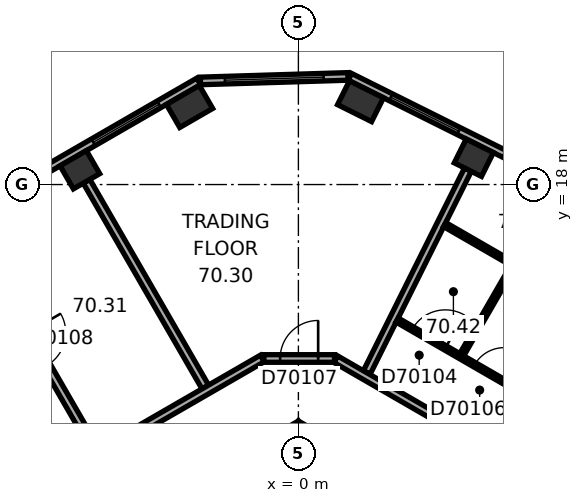
"""IFC4 building model, lengths in metres.
Left out: names, types, materials, properties, quantities, classifications, styles, units other than length and angle.
Written with IfcOpenShell. Run it as: python <this file> out.ifc"""

import sys

from ifc_helpers import new_model, si_unit, direction, frame, frame_2d, origin, origin_2d, place, context, subcontext, project, spatial, rectangle, extrude, element, fill, save


model = new_model("IFC4")
c1 = context("Model", 3, precision=1e-05, world=origin(), true_north=direction((0.0, 1.0)))
c2 = subcontext(c1, "Body", "Model", "MODEL_VIEW")
j1 = project(units=[si_unit("LENGTHUNIT", "METRE"), si_unit("PLANEANGLEUNIT", "RADIAN")], contexts=[c1])
p1 = place(None, origin())
s1 = spatial("IfcSite", under=j1, at=p1, CompositionType="ELEMENT")
p2 = place(p1, origin())
s2 = spatial("IfcBuilding", under=s1, at=p2, CompositionType="ELEMENT")
p3 = place(p2, frame((0.0, 0.0, 285.7)))
s3 = spatial("IfcBuildingStorey", under=s2, at=p3, CompositionType="ELEMENT", Elevation=285.7)
p4 = place(p3, frame((4.616, 18.706, 0.0), z_axis=(0.0, 0.0, 1.0), x_axis=(-0.894934361602, 0.44619781311, 0.0)))
e1 = element("IfcColumn", 1, at=p4, inside=s3, PredefinedType="COLUMN", context=c2, shape_type="SweptSolid", body=[
    extrude(rectangle(XDim=0.8, YDim=0.7, at=origin_2d()), origin(), (0.0, 0.0, 1.0), 3.7),
])
for number, where, z_axis, x_axis in (
    (2, (1.635, 20.192, 0.0), (0.0, 0.0, 1.0), (-0.895, 0.446, 0.0)),
    (3, (-2.864, 20.055, 0.0), (0.0, 0.0, 1.0), (-0.866, -0.5, 0.0)),
):
    element("IfcColumn", number, at=place(p3, frame(where, z_axis=z_axis, x_axis=x_axis)), inside=s3, PredefinedType="COLUMN", context=c2, shape_type="SweptSolid", body=[
        extrude(rectangle(XDim=1.0, YDim=0.7, at=origin_2d()), origin(), (0.0, 0.0, 1.0), 3.7),
    ])
p5 = place(p3, frame((-5.75, 18.389, 0.0), z_axis=(0.0, 0.0, 1.0), x_axis=(-0.866025403784, -0.5, 0.0)))
e4 = element("IfcColumn", 4, at=p5, inside=s3, PredefinedType="COLUMN", context=c2, shape_type="SweptSolid", body=[
    extrude(rectangle(XDim=0.8, YDim=0.7, at=origin_2d()), origin(), (0.0, 0.0, 1.0), 3.7),
])
p6 = place(p3, frame((10.025, 5.586, 0.0), z_axis=(0.0, 0.0, 1.0), x_axis=(-0.866026453023, 0.499998182661, 0.0)))
e5 = element("IfcWall", 5, at=p6, inside=s3, PredefinedType="SHEAR", context=c2, shape_type="SweptSolid", body=[
    extrude(rectangle(XDim=11.778, YDim=0.7, at=frame_2d((5.889, 0.0))), origin(), (0.0, 0.0, 1.0), 3.7),
])
p7 = place(p6, frame((5.139, 0.0, 0.0)))
e6 = element("IfcOpeningElement", 6, at=p7, cuts=e5, PredefinedType="OPENING", context=c2, shape_type="SweptSolid", body=[
    extrude(rectangle(XDim=0.9, YDim=2.1, at=frame_2d((0.45, 1.05))), frame((0.0, 0.36, 0.0), z_axis=(0.0, -1.0, 0.0), x_axis=(1.0, 0.0, 0.0)), (0.0, 0.0, 1.0), 0.72),
])
p8 = place(p3, frame((0.175, 11.475, 0.0), z_axis=(0.0, 0.0, 1.0), x_axis=(-0.866026453023, -0.499998182661, 0.0)))
e7 = element("IfcWall", 7, at=p8, inside=s3, PredefinedType="SHEAR", context=c2, shape_type="SweptSolid", body=[
    extrude(rectangle(XDim=11.778, YDim=0.7, at=frame_2d((5.889, 0.0))), origin(), (0.0, 0.0, 1.0), 3.7),
])
p9 = place(p8, frame((6.089, 0.0, 0.0)))
e8 = element("IfcOpeningElement", 8, at=p9, cuts=e7, PredefinedType="OPENING", context=c2, shape_type="SweptSolid", body=[
    extrude(rectangle(XDim=1.5, YDim=2.1, at=frame_2d((0.75, 1.05))), frame((0.0, 0.36, 0.0), z_axis=(0.0, -1.0, 0.0), x_axis=(1.0, 0.0, 0.0)), (0.0, 0.0, 1.0), 0.72),
])
p10 = place(p8, frame((2.939, 0.0, 0.0)))
e9 = element("IfcOpeningElement", 9, at=p10, cuts=e7, PredefinedType="OPENING", context=c2, shape_type="SweptSolid", body=[
    extrude(rectangle(XDim=0.9, YDim=2.1, at=frame_2d((0.45, 1.05))), frame((0.0, 0.36, 0.0), z_axis=(0.0, -1.0, 0.0), x_axis=(1.0, 0.0, 0.0)), (0.0, 0.0, 1.0), 0.72),
])
p11 = place(p3, frame((17.223, 12.923, 0.0), z_axis=(0.0, 0.0, 1.0), x_axis=(-0.894930561148, 0.44620543556, 0.0)))
e10 = element("IfcWall", 10, at=p11, inside=s3, PredefinedType="STANDARD", context=c2, shape_type="SweptSolid", body=[
    extrude(rectangle(XDim=17.731, YDim=0.2, at=frame_2d((8.866, 0.0))), origin(), (0.0, 0.0, 1.0), 3.7),
])
p12 = place(p11, frame((1.202, 0.0, 0.9)))
e11 = element("IfcOpeningElement", 11, at=p12, cuts=e10, PredefinedType="OPENING", context=c2, shape_type="SweptSolid", body=[
    extrude(rectangle(XDim=2.0, YDim=2.0, at=frame_2d((1.0, 1.0))), frame((0.0, 0.11, 0.0), z_axis=(0.0, -1.0, 0.0), x_axis=(1.0, 0.0, 0.0)), (0.0, 0.0, 1.0), 0.22),
])
p13 = place(p11, frame((4.533, 0.0, 0.9)))
e12 = element("IfcOpeningElement", 12, at=p13, cuts=e10, PredefinedType="OPENING", context=c2, shape_type="SweptSolid", body=[
    extrude(rectangle(XDim=2.0, YDim=2.0, at=frame_2d((1.0, 1.0))), frame((0.0, 0.11, 0.0), z_axis=(0.0, -1.0, 0.0), x_axis=(1.0, 0.0, 0.0)), (0.0, 0.0, 1.0), 0.22),
])
p14 = place(p11, frame((7.865, 0.0, 0.9)))
e13 = element("IfcOpeningElement", 13, at=p14, cuts=e10, PredefinedType="OPENING", context=c2, shape_type="SweptSolid", body=[
    extrude(rectangle(XDim=2.0, YDim=2.0, at=frame_2d((1.0, 1.0))), frame((0.0, 0.11, 0.0), z_axis=(0.0, -1.0, 0.0), x_axis=(1.0, 0.0, 0.0)), (0.0, 0.0, 1.0), 0.22),
])
p15 = place(p11, frame((11.197, 0.0, 0.9)))
e14 = element("IfcOpeningElement", 14, at=p15, cuts=e10, PredefinedType="OPENING", context=c2, shape_type="SweptSolid", body=[
    extrude(rectangle(XDim=2.0, YDim=2.0, at=frame_2d((1.0, 1.0))), frame((0.0, 0.11, 0.0), z_axis=(0.0, -1.0, 0.0), x_axis=(1.0, 0.0, 0.0)), (0.0, 0.0, 1.0), 0.22),
])
p16 = place(p11, frame((14.528, 0.0, 0.9)))
e15 = element("IfcOpeningElement", 15, at=p16, cuts=e10, PredefinedType="OPENING", context=c2, shape_type="SweptSolid", body=[
    extrude(rectangle(XDim=2.0, YDim=2.0, at=frame_2d((1.0, 1.0))), frame((0.0, 0.11, 0.0), z_axis=(0.0, -1.0, 0.0), x_axis=(1.0, 0.0, 0.0)), (0.0, 0.0, 1.0), 0.22),
])
p17 = place(p3, frame((1.307, 20.845, 0.0), z_axis=(0.0, 0.0, 1.0), x_axis=(-0.999533654813, -0.030536419175, 0.0)))
e16 = element("IfcWall", 16, at=p17, inside=s3, PredefinedType="STANDARD", context=c2, shape_type="SweptSolid", body=[
    extrude(rectangle(XDim=3.885, YDim=0.2, at=frame_2d((1.943, 0.0))), origin(), (0.0, 0.0, 1.0), 3.7),
])
p18 = place(p17, frame((0.643, 0.0, 0.9)))
e17 = element("IfcOpeningElement", 17, at=p18, cuts=e16, PredefinedType="OPENING", context=c2, shape_type="SweptSolid", body=[
    extrude(rectangle(XDim=2.6, YDim=2.0, at=frame_2d((1.3, 1.0))), frame((0.0, 0.11, 0.0), z_axis=(0.0, -1.0, 0.0), x_axis=(1.0, 0.0, 0.0)), (0.0, 0.0, 1.0), 0.22),
])
p19 = place(p3, frame((-2.624, 20.713, 0.0), z_axis=(0.0, 0.0, 1.0), x_axis=(-0.866026460444, -0.499998169808, 0.0)))
e18 = element("IfcWall", 18, at=p19, inside=s3, PredefinedType="STANDARD", context=c2, shape_type="SweptSolid", body=[
    extrude(rectangle(XDim=17.731, YDim=0.2, at=frame_2d((8.866, 0.0))), origin(), (0.0, 0.0, 1.0), 3.7),
])
p20 = place(p19, frame((1.203, 0.0, 0.9)))
e19 = element("IfcOpeningElement", 19, at=p20, cuts=e18, PredefinedType="OPENING", context=c2, shape_type="SweptSolid", body=[
    extrude(rectangle(XDim=2.0, YDim=2.0, at=frame_2d((1.0, 1.0))), frame((0.0, 0.11, 0.0), z_axis=(0.0, -1.0, 0.0), x_axis=(1.0, 0.0, 0.0)), (0.0, 0.0, 1.0), 0.22),
])
p21 = place(p19, frame((4.535, 0.0, 0.9)))
e20 = element("IfcOpeningElement", 20, at=p21, cuts=e18, PredefinedType="OPENING", context=c2, shape_type="SweptSolid", body=[
    extrude(rectangle(XDim=2.0, YDim=2.0, at=frame_2d((1.0, 1.0))), frame((0.0, 0.11, 0.0), z_axis=(0.0, -1.0, 0.0), x_axis=(1.0, 0.0, 0.0)), (0.0, 0.0, 1.0), 0.22),
])
p22 = place(p19, frame((7.867, 0.0, 0.9)))
e21 = element("IfcOpeningElement", 21, at=p22, cuts=e18, PredefinedType="OPENING", context=c2, shape_type="SweptSolid", body=[
    extrude(rectangle(XDim=2.0, YDim=2.0, at=frame_2d((1.0, 1.0))), frame((0.0, 0.11, 0.0), z_axis=(0.0, -1.0, 0.0), x_axis=(1.0, 0.0, 0.0)), (0.0, 0.0, 1.0), 0.22),
])
p23 = place(p19, frame((11.198, 0.0, 0.9)))
e22 = element("IfcOpeningElement", 22, at=p23, cuts=e18, PredefinedType="OPENING", context=c2, shape_type="SweptSolid", body=[
    extrude(rectangle(XDim=2.0, YDim=2.0, at=frame_2d((1.0, 1.0))), frame((0.0, 0.11, 0.0), z_axis=(0.0, -1.0, 0.0), x_axis=(1.0, 0.0, 0.0)), (0.0, 0.0, 1.0), 0.22),
])
p24 = place(p19, frame((14.53, 0.0, 0.9)))
e23 = element("IfcOpeningElement", 23, at=p24, cuts=e18, PredefinedType="OPENING", context=c2, shape_type="SweptSolid", body=[
    extrude(rectangle(XDim=2.0, YDim=2.0, at=frame_2d((1.0, 1.0))), frame((0.0, 0.11, 0.0), z_axis=(0.0, -1.0, 0.0), x_axis=(1.0, 0.0, 0.0)), (0.0, 0.0, 1.0), 0.22),
])
p25 = place(p3, frame((-8.46, 16.42, 0.0), z_axis=(0.0, 0.0, 1.0), x_axis=(0.500005339912, -0.866022320763, 0.0)))
e24 = element("IfcWall", 24, at=p25, inside=s3, PredefinedType="PARTITIONING", context=c2, shape_type="SweptSolid", body=[
    extrude(rectangle(XDim=6.35, YDim=0.2, at=frame_2d((3.175, 0.0))), origin(), (0.0, 0.0, 1.0), 2.87),
])
p26 = place(p25, frame((2.675, 0.0, 0.0)))
e25 = element("IfcOpeningElement", 25, at=p26, cuts=e24, PredefinedType="OPENING", context=c2, shape_type="SweptSolid", body=[
    extrude(rectangle(XDim=1.0, YDim=2.1, at=frame_2d((0.5, 1.05))), frame((0.0, 0.11, 0.0), z_axis=(0.0, -1.0, 0.0), x_axis=(1.0, 0.0, 0.0)), (0.0, 0.0, 1.0), 0.22),
])
p27 = place(p3, frame((-5.575, 18.086, 0.0), z_axis=(0.0, 0.0, 1.0), x_axis=(0.500004234368, -0.866022959057, 0.0)))
e26 = element("IfcWall", 26, at=p27, inside=s3, PredefinedType="PARTITIONING", context=c2, shape_type="SweptSolid", body=[
    extrude(rectangle(XDim=6.25, YDim=0.2, at=frame_2d((3.125, 0.0))), origin(), (0.0, 0.0, 1.0), 3.42),
])
p28 = place(p3, frame((-0.95, 13.423, 0.0), z_axis=(0.0, 0.0, 1.0), x_axis=(-0.86603557629, -0.499982380289, 0.0)))
e27 = element("IfcWall", 27, at=p28, inside=s3, PredefinedType="PARTITIONING", context=c2, shape_type="SweptSolid", body=[
    extrude(rectangle(XDim=4.906, YDim=0.2, at=frame_2d((2.453, 0.0))), origin(), (0.0, 0.0, 1.0), 3.42),
])
p29 = place(p3, frame((0.95, 13.423, 0.0), z_axis=(0.0, 0.0, 1.0), x_axis=(-1.0, 0.0, 0.0)))
e28 = element("IfcWall", 28, at=p29, inside=s3, PredefinedType="PARTITIONING", context=c2, shape_type="SweptSolid", body=[
    extrude(rectangle(XDim=1.86, YDim=0.2, at=frame_2d((0.93, 0.0))), origin(), (0.0, 0.0, 1.0), 3.42),
])
p30 = place(p29, frame((0.43, 0.0, 0.0)))
e29 = element("IfcOpeningElement", 29, at=p30, cuts=e28, PredefinedType="OPENING", context=c2, shape_type="SweptSolid", body=[
    extrude(rectangle(XDim=1.0, YDim=2.1, at=frame_2d((0.5, 1.05))), frame((0.0, 0.11, 0.0), z_axis=(0.0, -1.0, 0.0), x_axis=(1.0, 0.0, 0.0)), (0.0, 0.0, 1.0), 0.22),
])
p31 = place(p3, frame((4.299, 13.522, 0.0), z_axis=(0.0, 0.0, 1.0), x_axis=(0.499982138324, 0.866035715982, 0.0)))
e30 = element("IfcWall", 30, at=p31, inside=s3, PredefinedType="PARTITIONING", context=c2, shape_type="SweptSolid", body=[
    extrude(rectangle(XDim=2.74, YDim=0.12, at=frame_2d((1.37, 0.0))), origin(), (0.0, 0.0, 1.0), 3.42),
])
p32 = place(p3, frame((4.46, 18.392, 0.0), z_axis=(0.0, 0.0, 1.0), x_axis=(-0.446197360024, -0.894934587502, 0.0)))
e31 = element("IfcWall", 31, at=p32, inside=s3, PredefinedType="PARTITIONING", context=c2, shape_type="SweptSolid", body=[
    extrude(rectangle(XDim=5.96, YDim=0.2, at=frame_2d((2.98, 0.0))), origin(), (0.0, 0.0, 1.0), 2.87),
])
p33 = place(p3, frame((5.617, 15.925, 0.0), z_axis=(0.0, 0.0, 1.0), x_axis=(-0.866010195725, 0.500026340207, 0.0)))
e32 = element("IfcWall", 32, at=p33, inside=s3, PredefinedType="PARTITIONING", context=c2, shape_type="SweptSolid", body=[
    extrude(rectangle(XDim=2.04, YDim=0.12, at=frame_2d((1.02, 0.0))), origin(), (0.0, 0.0, 1.0), 3.42),
])
p34 = place(p3, frame((8.207, 11.197, 0.0), z_axis=(0.0, 0.0, 1.0), x_axis=(-0.866030514021, 0.499991148707, 0.0)))
e33 = element("IfcWall", 33, at=p34, inside=s3, PredefinedType="PARTITIONING", context=c2, shape_type="SweptSolid", body=[
    extrude(rectangle(XDim=6.476, YDim=0.12, at=frame_2d((3.238, 0.0))), origin(), (0.0, 0.0, 1.0), 3.42),
])
p35 = place(p34, frame((5.011, 0.0, 0.0)))
e34 = element("IfcOpeningElement", 34, at=p35, cuts=e33, PredefinedType="OPENING", context=c2, shape_type="SweptSolid", body=[
    extrude(rectangle(XDim=1.0, YDim=2.1, at=frame_2d((0.5, 1.05))), frame((0.0, 0.07, 0.0), z_axis=(0.0, -1.0, 0.0), x_axis=(1.0, 0.0, 0.0)), (0.0, 0.0, 1.0), 0.14),
])
p36 = place(p34, frame((0.95, 0.0, 0.0)))
e35 = element("IfcOpeningElement", 35, at=p36, cuts=e33, PredefinedType="OPENING", context=c2, shape_type="SweptSolid", body=[
    extrude(rectangle(XDim=0.9, YDim=2.1, at=frame_2d((0.45, 1.05))), frame((0.0, 0.07, 0.0), z_axis=(0.0, -1.0, 0.0), x_axis=(1.0, 0.0, 0.0)), (0.0, 0.0, 1.0), 0.14),
])
p37 = place(p34, frame((3.223, 0.0, 0.0)))
e36 = element("IfcOpeningElement", 36, at=p37, cuts=e33, PredefinedType="OPENING", context=c2, shape_type="SweptSolid", body=[
    extrude(rectangle(XDim=0.9, YDim=2.1, at=frame_2d((0.45, 1.05))), frame((0.0, 0.07, 0.0), z_axis=(0.0, -1.0, 0.0), x_axis=(1.0, 0.0, 0.0)), (0.0, 0.0, 1.0), 0.14),
])
p38 = place(p3, frame((10.934, 7.659, 0.0), z_axis=(0.0, 0.0, 1.0), x_axis=(-0.866030932647, 0.499990423607, 0.0)))
e37 = element("IfcWall", 37, at=p38, inside=s3, PredefinedType="PARTITIONING", context=c2, shape_type="SweptSolid", body=[
    extrude(rectangle(XDim=11.488, YDim=0.2, at=frame_2d((5.744, 0.0))), origin(), (0.0, 0.0, 1.0), 3.42),
])
p39 = place(p38, frame((6.764, 0.0, 0.0)))
e38 = element("IfcOpeningElement", 38, at=p39, cuts=e37, PredefinedType="OPENING", context=c2, shape_type="SweptSolid", body=[
    extrude(rectangle(XDim=1.0, YDim=2.1, at=frame_2d((0.5, 1.05))), frame((0.0, 0.11, 0.0), z_axis=(0.0, -1.0, 0.0), x_axis=(1.0, 0.0, 0.0)), (0.0, 0.0, 1.0), 0.22),
])
p40 = place(p16, origin())
e39 = element("IfcWindow", 39, at=p40, inside=s3, PartitioningType="SINGLE_PANEL", PredefinedType="WINDOW", context=c2, shape_type="SweptSolid", body=[
    extrude(rectangle(XDim=2.0, YDim=2.0, at=frame_2d((1.0, 1.0))), frame((0.0, 0.03, 0.0), z_axis=(0.0, -1.0, 0.0), x_axis=(1.0, 0.0, 0.0)), (0.0, 0.0, 1.0), 0.06),
])
fill(e15, e39)
p41 = place(p18, origin())
e40 = element("IfcWindow", 40, at=p41, inside=s3, PartitioningType="SINGLE_PANEL", PredefinedType="WINDOW", context=c2, shape_type="SweptSolid", body=[
    extrude(rectangle(XDim=2.6, YDim=2.0, at=frame_2d((1.3, 1.0))), frame((0.0, 0.03, 0.0), z_axis=(0.0, -1.0, 0.0), x_axis=(1.0, 0.0, 0.0)), (0.0, 0.0, 1.0), 0.06),
])
fill(e17, e40)
p42 = place(p20, origin())
e41 = element("IfcWindow", 41, at=p42, inside=s3, PartitioningType="SINGLE_PANEL", PredefinedType="WINDOW", context=c2, shape_type="SweptSolid", body=[
    extrude(rectangle(XDim=2.0, YDim=2.0, at=frame_2d((1.0, 1.0))), frame((0.0, 0.03, 0.0), z_axis=(0.0, -1.0, 0.0), x_axis=(1.0, 0.0, 0.0)), (0.0, 0.0, 1.0), 0.06),
])
fill(e19, e41)
p43 = place(p35, origin())
e42 = element("IfcDoor", 42, at=p43, inside=s3, OperationType="SINGLE_SWING_LEFT", PredefinedType="DOOR", context=c2, shape_type="SweptSolid", body=[
    extrude(rectangle(XDim=1.0, YDim=2.1, at=frame_2d((0.5, 1.05))), frame((0.0, 0.025, 0.0), z_axis=(0.0, -1.0, 0.0), x_axis=(1.0, 0.0, 0.0)), (0.0, 0.0, 1.0), 0.05),
])
fill(e34, e42)
p44 = place(p37, origin())
e43 = element("IfcDoor", 43, at=p44, inside=s3, OperationType="SINGLE_SWING_LEFT", PredefinedType="DOOR", context=c2, shape_type="SweptSolid", body=[
    extrude(rectangle(XDim=0.9, YDim=2.1, at=frame_2d((0.45, 1.05))), frame((0.0, 0.025, 0.0), z_axis=(0.0, -1.0, 0.0), x_axis=(1.0, 0.0, 0.0)), (0.0, 0.0, 1.0), 0.05),
])
fill(e36, e43)
p45 = place(p30, origin())
e44 = element("IfcDoor", 44, at=p45, inside=s3, OperationType="SINGLE_SWING_LEFT", PredefinedType="DOOR", context=c2, shape_type="SweptSolid", body=[
    extrude(rectangle(XDim=1.0, YDim=2.1, at=frame_2d((0.5, 1.05))), frame((0.0, 0.025, 0.0), z_axis=(0.0, -1.0, 0.0), x_axis=(1.0, 0.0, 0.0)), (0.0, 0.0, 1.0), 0.05),
])
fill(e29, e44)
save(model, sys.argv[1])
